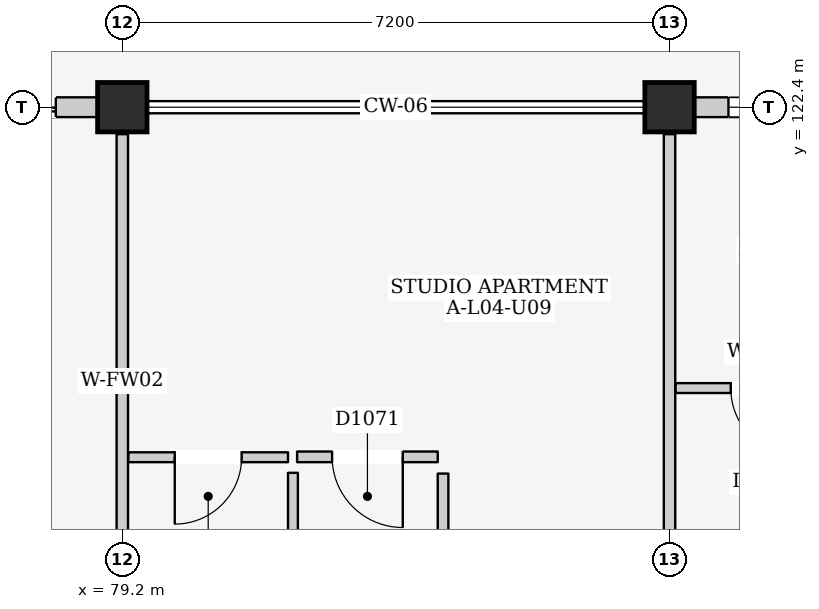
"""IFC4 building model, lengths in metres.
Left out: names, types, materials, properties, quantities, classifications, styles, units other than length and angle.
Written with IfcOpenShell. Run it as: python <this file> out.ifc"""

import sys

from ifc_helpers import new_model, si_unit, direction, frame, frame_2d, origin, origin_2d, place, context, subcontext, project, spatial, rectangle, extrude, element, fill, save


model = new_model("IFC4")
c1 = context("Model", 3, precision=1e-05, world=origin(), true_north=direction((0.0, 1.0)))
c2 = subcontext(c1, "Body", "Model", "MODEL_VIEW")
j1 = project(units=[si_unit("LENGTHUNIT", "METRE"), si_unit("PLANEANGLEUNIT", "RADIAN")], contexts=[c1])
p1 = place(None, origin())
s1 = spatial("IfcSite", under=j1, at=p1, CompositionType="ELEMENT")
p2 = place(p1, origin())
s2 = spatial("IfcBuilding", under=s1, at=p2, CompositionType="ELEMENT")
p3 = place(p2, frame((0.0, 0.0, 15.4)))
s3 = spatial("IfcBuildingStorey", under=s2, at=p3, CompositionType="ELEMENT", Elevation=15.4)
for number, where, z_axis, x_axis in (
    (1, (79.2, 122.4, 0.0), (0.0, 0.0, 1.0), (1.0, 0.0, 0.0)),
    (2, (86.4, 122.4, 0.0), (0.0, 0.0, 1.0), (1.0, 0.0, 0.0)),
):
    element("IfcColumn", number, at=place(p3, frame(where, z_axis=z_axis, x_axis=x_axis)), inside=s3, PredefinedType="COLUMN", context=c2, shape_type="SweptSolid", body=[
        extrude(rectangle(XDim=0.65, YDim=0.65, at=origin_2d()), origin(), (0.0, 0.0, 1.0), 3.2),
    ])
p4 = place(p3, frame((72.325, 122.4, 0.0), z_axis=(0.0, 0.0, 1.0), x_axis=(1.0, 0.0, 0.0)))
e3 = element("IfcWall", 3, at=p4, inside=s3, PredefinedType="ELEMENTEDWALL", context=c2, shape_type="SweptSolid", body=[
    extrude(rectangle(XDim=6.55, YDim=0.26, at=frame_2d((3.275, 0.0))), origin(), (0.0, 0.0, 1.0), 2.43),
])
p5 = place(p4, frame((3.6, 0.0, 0.0)))
e4 = element("IfcOpeningElement", 4, at=p5, cuts=e3, PredefinedType="OPENING", context=c2, shape_type="SweptSolid", body=[
    extrude(rectangle(XDim=2.4, YDim=2.12, at=frame_2d((1.2, 1.06))), frame((0.0, 0.145, 0.0), z_axis=(0.0, -1.0, 0.0), x_axis=(1.0, 0.0, 0.0)), (0.0, 0.0, 1.0), 0.29),
])
p6 = place(p4, frame((0.45, 0.0, 0.86)))
e5 = element("IfcOpeningElement", 5, at=p6, cuts=e3, PredefinedType="OPENING", context=c2, shape_type="SweptSolid", body=[
    extrude(rectangle(XDim=1.55, YDim=1.45, at=frame_2d((0.775, 0.725))), frame((0.0, 0.145, 0.0), z_axis=(0.0, -1.0, 0.0), x_axis=(1.0, 0.0, 0.0)), (0.0, 0.0, 1.0), 0.29),
])
p7 = place(p3, frame((86.725, 122.4, 0.0), z_axis=(0.0, 0.0, 1.0), x_axis=(1.0, 0.0, 0.0)))
e6 = element("IfcWall", 6, at=p7, inside=s3, PredefinedType="ELEMENTEDWALL", context=c2, shape_type="SweptSolid", body=[
    extrude(rectangle(XDim=6.55, YDim=0.26, at=frame_2d((3.275, 0.0))), origin(), (0.0, 0.0, 1.0), 2.43),
])
p8 = place(p7, frame((4.6, 0.0, 0.0)))
e7 = element("IfcOpeningElement", 7, at=p8, cuts=e6, PredefinedType="OPENING", context=c2, shape_type="SweptSolid", body=[
    extrude(rectangle(XDim=1.4, YDim=2.1, at=frame_2d((0.7, 1.05))), frame((0.0, 0.145, 0.0), z_axis=(0.0, -1.0, 0.0), x_axis=(1.0, 0.0, 0.0)), (0.0, 0.0, 1.0), 0.29),
])
p9 = place(p7, frame((0.45, 0.0, 0.9)))
e8 = element("IfcOpeningElement", 8, at=p9, cuts=e6, PredefinedType="OPENING", context=c2, shape_type="SweptSolid", body=[
    extrude(rectangle(XDim=1.3, YDim=1.25, at=frame_2d((0.65, 0.625))), frame((0.0, 0.145, 0.0), z_axis=(0.0, -1.0, 0.0), x_axis=(1.0, 0.0, 0.0)), (0.0, 0.0, 1.0), 0.29),
])
for number, where, z_axis, x_axis in (
    (9, (79.2, 115.555, 0.0), (0.0, 0.0, 1.0), (0.0, 1.0, 0.0)),
    (10, (86.4, 115.555, 0.0), (0.0, 0.0, 1.0), (0.0, 1.0, 0.0)),
):
    element("IfcWall", number, at=place(p3, frame(where, z_axis=z_axis, x_axis=x_axis)), inside=s3, PredefinedType="PARTITIONING", context=c2, shape_type="SweptSolid", body=[
        extrude(rectangle(XDim=6.49, YDim=0.15, at=frame_2d((3.245, 0.0))), origin(), (0.0, 0.0, 1.0), 2.385),
    ])
p10 = place(p3, frame((79.28, 117.795, 0.0), z_axis=(0.0, 0.0, 1.0), x_axis=(1.0, 0.0, 0.0)))
e11 = element("IfcWall", 11, at=p10, inside=s3, PredefinedType="PARTITIONING", context=c2, shape_type="SweptSolid", body=[
    extrude(rectangle(XDim=2.1, YDim=0.13, at=frame_2d((1.05, 0.0))), origin(), (0.0, 0.0, 1.0), 2.95),
])
p11 = place(p10, frame((0.61, 0.0, 0.0)))
e12 = element("IfcOpeningElement", 12, at=p11, cuts=e11, PredefinedType="OPENING", context=c2, shape_type="SweptSolid", body=[
    extrude(rectangle(XDim=0.88, YDim=2.1, at=frame_2d((0.44, 1.05))), frame((0.0, 0.08, 0.0), z_axis=(0.0, -1.0, 0.0), x_axis=(1.0, 0.0, 0.0)), (0.0, 0.0, 1.0), 0.16),
])
p12 = place(p3, frame((81.445, 115.46, 0.0), z_axis=(0.0, 0.0, 1.0), x_axis=(0.0, 1.0, 0.0)))
e13 = element("IfcWall", 13, at=p12, inside=s3, PredefinedType="PARTITIONING", context=c2, shape_type="SweptSolid", body=[
    extrude(rectangle(XDim=2.13, YDim=0.13, at=frame_2d((1.065, 0.0))), origin(), (0.0, 0.0, 1.0), 2.95),
])
p13 = place(p3, frame((81.5, 117.8, 0.0), z_axis=(0.0, 0.0, 1.0), x_axis=(1.0, 0.0, 0.0)))
e14 = element("IfcWall", 14, at=p13, inside=s3, PredefinedType="PARTITIONING", context=c2, shape_type="SweptSolid", body=[
    extrude(rectangle(XDim=1.85, YDim=0.14, at=frame_2d((0.925, 0.0))), origin(), (0.0, 0.0, 1.0), 2.95),
])
p14 = place(p13, frame((0.46, 0.0, 0.0)))
e15 = element("IfcOpeningElement", 15, at=p14, cuts=e14, PredefinedType="OPENING", context=c2, shape_type="SweptSolid", body=[
    extrude(rectangle(XDim=0.93, YDim=2.14, at=frame_2d((0.465, 1.07))), frame((0.0, 0.085, 0.0), z_axis=(0.0, -1.0, 0.0), x_axis=(1.0, 0.0, 0.0)), (0.0, 0.0, 1.0), 0.17),
])
p15 = place(p3, frame((83.42, 115.43, 0.0), z_axis=(0.0, 0.0, 1.0), x_axis=(0.0, 1.0, 0.0)))
e16 = element("IfcWall", 16, at=p15, inside=s3, PredefinedType="PARTITIONING", context=c2, shape_type="SweptSolid", body=[
    extrude(rectangle(XDim=2.15, YDim=0.14, at=frame_2d((1.075, 0.0))), origin(), (0.0, 0.0, 1.0), 2.95),
])
p16 = place(p3, frame((86.48, 118.705, 0.0), z_axis=(0.0, 0.0, 1.0), x_axis=(1.0, 0.0, 0.0)))
e17 = element("IfcWall", 17, at=p16, inside=s3, PredefinedType="PARTITIONING", context=c2, shape_type="SweptSolid", body=[
    extrude(rectangle(XDim=2.35, YDim=0.13, at=frame_2d((1.175, 0.0))), origin(), (0.0, 0.0, 1.0), 2.95),
])
p17 = place(p16, frame((0.725, 0.0, 0.0)))
e18 = element("IfcOpeningElement", 18, at=p17, cuts=e17, PredefinedType="OPENING", context=c2, shape_type="SweptSolid", body=[
    extrude(rectangle(XDim=0.9, YDim=2.1, at=frame_2d((0.45, 1.05))), frame((0.0, 0.08, 0.0), z_axis=(0.0, -1.0, 0.0), x_axis=(1.0, 0.0, 0.0)), (0.0, 0.0, 1.0), 0.16),
])
p18 = place(p5, frame((2.4, 0.0, 0.0), z_axis=(0.0, 0.0, 1.0), x_axis=(-1.0, 0.0, 0.0)))
e19 = element("IfcDoor", 19, at=p18, inside=s3, OperationType="DOUBLE_DOOR_SLIDING", PredefinedType="DOOR", context=c2, shape_type="SweptSolid", body=[
    extrude(rectangle(XDim=2.4, YDim=2.12, at=frame_2d((1.2, 1.06))), frame((0.0, 0.025, 0.0), z_axis=(0.0, -1.0, 0.0), x_axis=(1.0, 0.0, 0.0)), (0.0, 0.0, 1.0), 0.05),
])
fill(e4, e19)
p19 = place(p9, origin())
e20 = element("IfcWindow", 20, at=p19, inside=s3, PartitioningType="SINGLE_PANEL", PredefinedType="WINDOW", context=c2, shape_type="SweptSolid", body=[
    extrude(rectangle(XDim=1.3, YDim=1.25, at=frame_2d((0.65, 0.625))), frame((0.0, 0.03, 0.0), z_axis=(0.0, -1.0, 0.0), x_axis=(1.0, 0.0, 0.0)), (0.0, 0.0, 1.0), 0.06),
])
fill(e8, e20)
p20 = place(p11, frame((0.88, 0.0, 0.0), z_axis=(0.0, 0.0, 1.0), x_axis=(-1.0, 0.0, 0.0)))
e21 = element("IfcDoor", 21, at=p20, inside=s3, OperationType="SINGLE_SWING_RIGHT", PredefinedType="DOOR", context=c2, shape_type="SweptSolid", body=[
    extrude(rectangle(XDim=0.88, YDim=2.1, at=frame_2d((0.44, 1.05))), frame((0.0, 0.025, 0.0), z_axis=(0.0, -1.0, 0.0), x_axis=(1.0, 0.0, 0.0)), (0.0, 0.0, 1.0), 0.05),
])
fill(e12, e21)
p21 = place(p14, frame((0.93, 0.0, 0.0), z_axis=(0.0, 0.0, 1.0), x_axis=(-1.0, 0.0, 0.0)))
e22 = element("IfcDoor", 22, at=p21, inside=s3, OperationType="SINGLE_SWING_LEFT", PredefinedType="DOOR", context=c2, shape_type="SweptSolid", body=[
    extrude(rectangle(XDim=0.93, YDim=2.14, at=frame_2d((0.465, 1.07))), frame((0.0, 0.025, 0.0), z_axis=(0.0, -1.0, 0.0), x_axis=(1.0, 0.0, 0.0)), (0.0, 0.0, 1.0), 0.05),
])
fill(e15, e22)
p22 = place(p17, frame((0.9, 0.0, 0.0), z_axis=(0.0, 0.0, 1.0), x_axis=(-1.0, 0.0, 0.0)))
e23 = element("IfcDoor", 23, at=p22, inside=s3, OperationType="SINGLE_SWING_LEFT", PredefinedType="DOOR", context=c2, shape_type="SweptSolid", body=[
    extrude(rectangle(XDim=0.9, YDim=2.1, at=frame_2d((0.45, 1.05))), frame((0.0, 0.025, 0.0), z_axis=(0.0, -1.0, 0.0), x_axis=(1.0, 0.0, 0.0)), (0.0, 0.0, 1.0), 0.05),
])
fill(e18, e23)
save(model, sys.argv[1])
